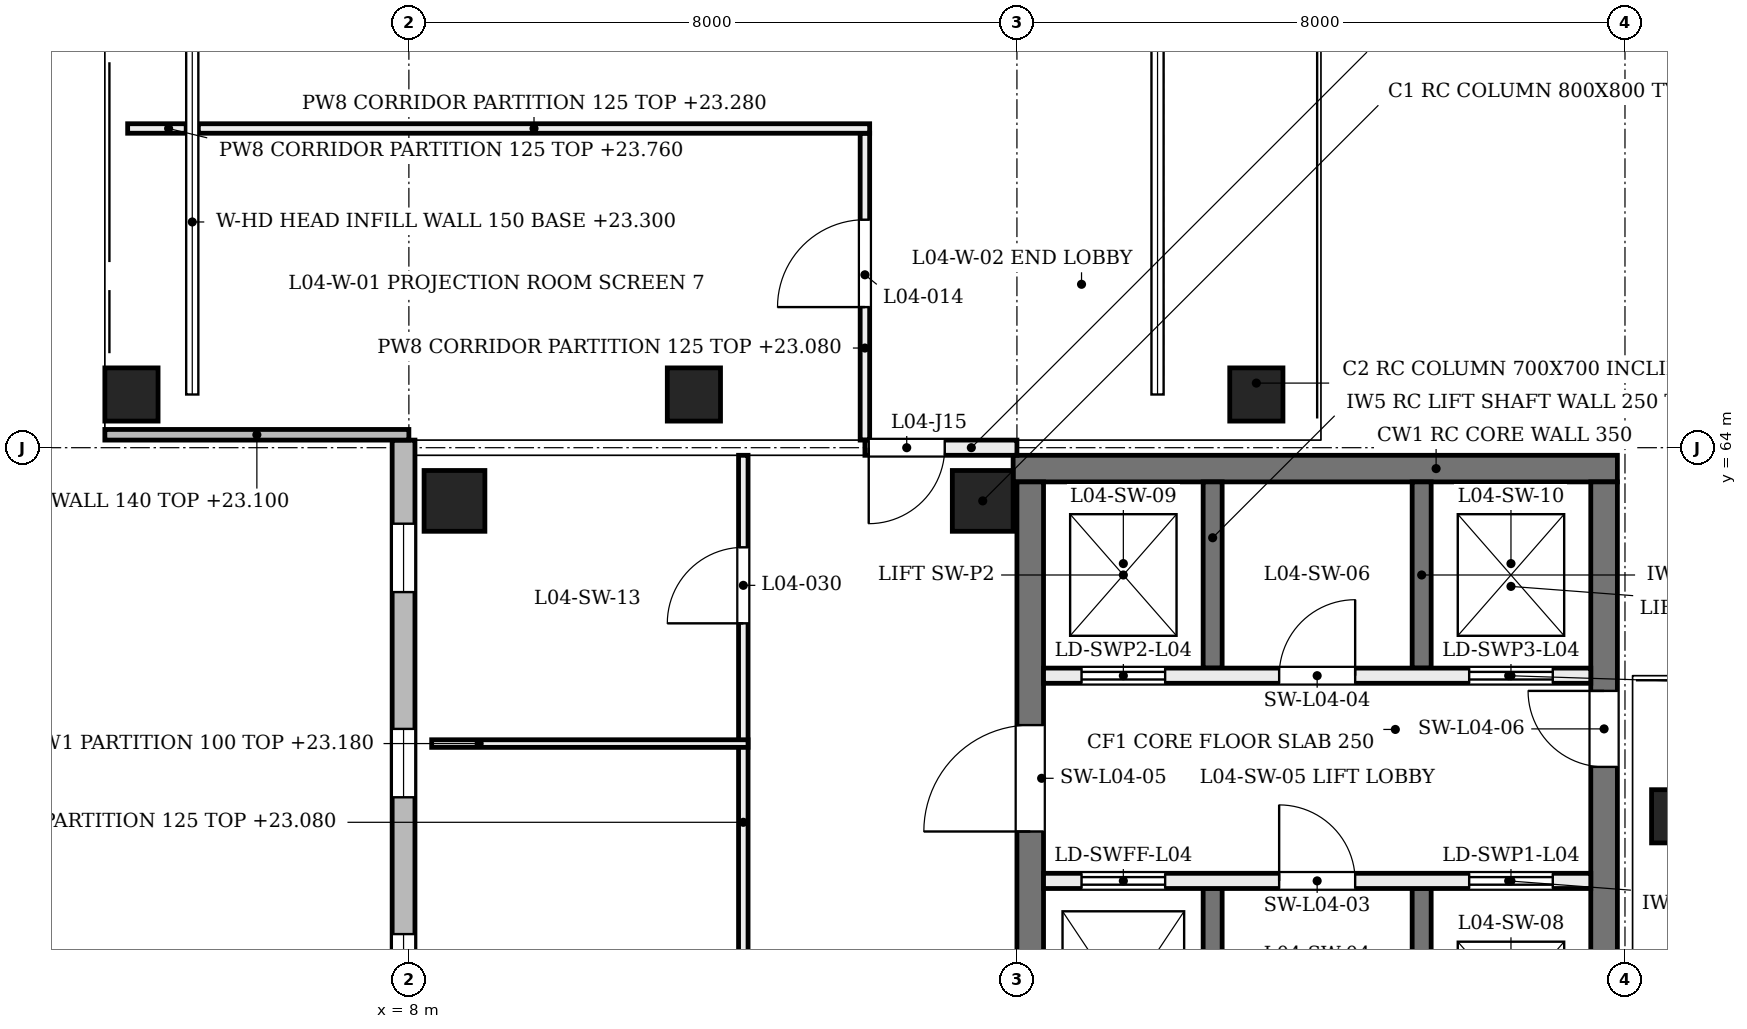
"""IFC4 building model, lengths in metres.
Left out: names, types, materials, properties, quantities, classifications, styles, units other than length and angle.
Written with IfcOpenShell. Run it as: python <this file> out.ifc"""

import sys

from ifc_helpers import new_model, si_unit, direction, frame, frame_2d, origin, origin_2d, place, context, subcontext, project, spatial, rectangle, extrude, element, fill, save


model = new_model("IFC4")
c1 = context("Model", 3, precision=1e-05, world=origin(), true_north=direction((0.0, 1.0)))
c2 = subcontext(c1, "Body", "Model", "MODEL_VIEW")
j1 = project(units=[si_unit("LENGTHUNIT", "METRE"), si_unit("PLANEANGLEUNIT", "RADIAN")], contexts=[c1])
p1 = place(None, origin())
s1 = spatial("IfcSite", under=j1, at=p1, CompositionType="ELEMENT")
p2 = place(p1, origin())
s2 = spatial("IfcBuilding", under=s1, at=p2, CompositionType="ELEMENT")
p3 = place(p2, frame((0.0, 0.0, 19.2)))
s3 = spatial("IfcBuildingStorey", under=s2, at=p3, CompositionType="ELEMENT", Elevation=19.2)
p4 = place(p3, frame((15.95, 63.725, 0.0), z_axis=(0.0, 0.0, 1.0), x_axis=(1.0, 0.0, 0.0)))
e1 = element("IfcWall", 1, at=p4, inside=s3, PredefinedType="SHEAR", context=c2, shape_type="SweptSolid", body=[
    extrude(rectangle(XDim=7.95, YDim=0.35, at=frame_2d((3.975, 0.0))), origin(), (0.0, 0.0, 1.0), 4.58),
])
p5 = place(p3, frame((16.175, 48.35, 0.0), z_axis=(0.0, 0.0, 1.0), x_axis=(0.0, 1.0, 0.0)))
e2 = element("IfcWall", 2, at=p5, inside=s3, PredefinedType="SHEAR", context=c2, shape_type="SweptSolid", body=[
    extrude(rectangle(XDim=15.2, YDim=0.35, at=frame_2d((7.6, 0.0))), origin(), (0.0, 0.0, 1.0), 4.58),
])
p6 = place(p5, frame((0.95, 0.0, 0.0)))
e3 = element("IfcOpeningElement", 3, at=p6, cuts=e2, PredefinedType="OPENING", context=c2, shape_type="SweptSolid", body=[
    extrude(rectangle(XDim=1.0, YDim=2.1, at=frame_2d((0.5, 1.05))), frame((0.0, 0.185, 0.0), z_axis=(0.0, -1.0, 0.0), x_axis=(1.0, 0.0, 0.0)), (0.0, 0.0, 1.0), 0.37),
])
p7 = place(p5, frame((10.6, 0.0, 0.0)))
e4 = element("IfcOpeningElement", 4, at=p7, cuts=e2, PredefinedType="OPENING", context=c2, shape_type="SweptSolid", body=[
    extrude(rectangle(XDim=1.4, YDim=2.1, at=frame_2d((0.7, 1.05))), frame((0.0, 0.185, 0.0), z_axis=(0.0, -1.0, 0.0), x_axis=(1.0, 0.0, 0.0)), (0.0, 0.0, 1.0), 0.37),
])
p8 = place(p3, frame((23.725, 48.35, 0.0), z_axis=(0.0, 0.0, 1.0), x_axis=(0.0, 1.0, 0.0)))
e5 = element("IfcWall", 5, at=p8, inside=s3, PredefinedType="SHEAR", context=c2, shape_type="SweptSolid", body=[
    extrude(rectangle(XDim=15.2, YDim=0.35, at=frame_2d((7.6, 0.0))), origin(), (0.0, 0.0, 1.0), 4.58),
])
p9 = place(p8, frame((0.95, 0.0, 0.0)))
e6 = element("IfcOpeningElement", 6, at=p9, cuts=e5, PredefinedType="OPENING", context=c2, shape_type="SweptSolid", body=[
    extrude(rectangle(XDim=1.0, YDim=2.1, at=frame_2d((0.5, 1.05))), frame((0.0, 0.185, 0.0), z_axis=(0.0, -1.0, 0.0), x_axis=(1.0, 0.0, 0.0)), (0.0, 0.0, 1.0), 0.37),
])
p10 = place(p8, frame((11.45, 0.0, 0.0)))
e7 = element("IfcOpeningElement", 7, at=p10, cuts=e5, PredefinedType="OPENING", context=c2, shape_type="SweptSolid", body=[
    extrude(rectangle(XDim=1.0, YDim=2.1, at=frame_2d((0.5, 1.05))), frame((0.0, 0.185, 0.0), z_axis=(0.0, -1.0, 0.0), x_axis=(1.0, 0.0, 0.0)), (0.0, 0.0, 1.0), 0.37),
])
for number, where, z_axis, x_axis in (
    (8, (8.6, 63.3, 0.0), (0.0, 0.0, 1.0), (1.0, 0.0, 0.0)),
    (9, (15.55, 63.3, 0.0), (0.0, 0.0, 1.0), (1.0, 0.0, 0.0)),
):
    element("IfcColumn", number, at=place(p3, frame(where, z_axis=z_axis, x_axis=x_axis)), inside=s3, PredefinedType="COLUMN", context=c2, shape_type="SweptSolid", body=[
        extrude(rectangle(XDim=0.8, YDim=0.8, at=origin_2d()), origin(), (0.0, 0.0, 1.0), 4.8),
    ])
for number, where, z_axis, x_axis in (
    (10, (24.7, 59.4, 0.0), (0.0, -0.204, 0.979), (1.0, 0.0, 0.0)),
    (11, (4.6, 64.7, 0.0), (-0.204, 0.0, 0.979), (0.0, -1.0, 0.0)),
    (12, (12.0, 64.7, 0.0), (-0.204, 0.0, 0.979), (0.0, -1.0, 0.0)),
    (13, (19.4, 64.7, 0.0), (-0.204, 0.0, 0.979), (0.0, -1.0, 0.0)),
):
    element("IfcColumn", number, at=place(p3, frame(where, z_axis=z_axis, x_axis=x_axis)), inside=s3, PredefinedType="COLUMN", context=c2, shape_type="SweptSolid", body=[
        extrude(rectangle(XDim=0.7, YDim=0.7, at=origin_2d()), origin(), (0.0, 0.0, 1.0), 4.903),
    ])
for number, where, z_axis, x_axis in (
    (14, (5.15, 64.9, 4.1), (0.0, 0.0, 1.0), (0.0, 1.0, 0.0)),
    (15, (17.85, 64.9, 4.1), (0.0, 0.0, 1.0), (0.0, 1.0, 0.0)),
):
    element("IfcWall", number, at=place(p3, frame(where, z_axis=z_axis, x_axis=x_axis)), inside=s3, PredefinedType="SOLIDWALL", context=c2, shape_type="SweptSolid", body=[
        extrude(rectangle(XDim=6.9, YDim=0.15, at=frame_2d((3.45, 0.0))), origin(), (0.0, 0.0, 1.0), 0.48),
    ])
p11 = place(p3, frame((7.93, 47.7, 0.0), z_axis=(0.0, 0.0, 1.0), x_axis=(0.0, 1.0, 0.0)))
e16 = element("IfcWall", 16, at=p11, inside=s3, PredefinedType="SOLIDWALL", context=c2, shape_type="SweptSolid", body=[
    extrude(rectangle(XDim=16.4, YDim=0.3, at=frame_2d((8.2, 0.0))), origin(), (0.0, 0.0, 1.0), 3.9),
])
p12 = place(p11, frame((0.9, 0.0, 0.75)))
e17 = element("IfcOpeningElement", 17, at=p12, cuts=e16, PredefinedType="OPENING", context=c2, shape_type="SweptSolid", body=[
    extrude(rectangle(XDim=0.9, YDim=3.1, at=frame_2d((0.45, 1.55))), frame((0.0, 0.16, 0.0), z_axis=(0.0, -1.0, 0.0), x_axis=(1.0, 0.0, 0.0)), (0.0, 0.0, 1.0), 0.32),
])
p13 = place(p11, frame((3.6, 0.0, 0.75)))
e18 = element("IfcOpeningElement", 18, at=p13, cuts=e16, PredefinedType="OPENING", context=c2, shape_type="SweptSolid", body=[
    extrude(rectangle(XDim=0.9, YDim=3.1, at=frame_2d((0.45, 1.55))), frame((0.0, 0.16, 0.0), z_axis=(0.0, -1.0, 0.0), x_axis=(1.0, 0.0, 0.0)), (0.0, 0.0, 1.0), 0.32),
])
p14 = place(p11, frame((6.3, 0.0, 0.75)))
e19 = element("IfcOpeningElement", 19, at=p14, cuts=e16, PredefinedType="OPENING", context=c2, shape_type="SweptSolid", body=[
    extrude(rectangle(XDim=0.9, YDim=3.1, at=frame_2d((0.45, 1.55))), frame((0.0, 0.16, 0.0), z_axis=(0.0, -1.0, 0.0), x_axis=(1.0, 0.0, 0.0)), (0.0, 0.0, 1.0), 0.32),
])
p15 = place(p11, frame((9.0, 0.0, 0.75)))
e20 = element("IfcOpeningElement", 20, at=p15, cuts=e16, PredefinedType="OPENING", context=c2, shape_type="SweptSolid", body=[
    extrude(rectangle(XDim=0.9, YDim=3.1, at=frame_2d((0.45, 1.55))), frame((0.0, 0.16, 0.0), z_axis=(0.0, -1.0, 0.0), x_axis=(1.0, 0.0, 0.0)), (0.0, 0.0, 1.0), 0.32),
])
p16 = place(p11, frame((11.7, 0.0, 0.75)))
e21 = element("IfcOpeningElement", 21, at=p16, cuts=e16, PredefinedType="OPENING", context=c2, shape_type="SweptSolid", body=[
    extrude(rectangle(XDim=0.9, YDim=3.1, at=frame_2d((0.45, 1.55))), frame((0.0, 0.16, 0.0), z_axis=(0.0, -1.0, 0.0), x_axis=(1.0, 0.0, 0.0)), (0.0, 0.0, 1.0), 0.32),
])
p17 = place(p11, frame((14.4, 0.0, 0.75)))
e22 = element("IfcOpeningElement", 22, at=p17, cuts=e16, PredefinedType="OPENING", context=c2, shape_type="SweptSolid", body=[
    extrude(rectangle(XDim=0.9, YDim=3.1, at=frame_2d((0.45, 1.55))), frame((0.0, 0.16, 0.0), z_axis=(0.0, -1.0, 0.0), x_axis=(1.0, 0.0, 0.0)), (0.0, 0.0, 1.0), 0.32),
])
p18 = place(p3, frame((4.0, 64.17, 0.0), z_axis=(0.0, 0.0, 1.0), x_axis=(1.0, 0.0, 0.0)))
e23 = element("IfcWall", 23, at=p18, inside=s3, PredefinedType="SOLIDWALL", context=c2, shape_type="SweptSolid", body=[
    extrude(rectangle(XDim=4.0, YDim=0.14, at=frame_2d((2.0, 0.0))), origin(), (0.0, 0.0, 1.0), 3.9),
])
p19 = place(p3, frame((18.575, 55.2, 0.0), z_axis=(0.0, 0.0, 1.0), x_axis=(0.0, 1.0, 0.0)))
e24 = element("IfcWall", 24, at=p19, inside=s3, PredefinedType="SOLIDWALL", context=c2, shape_type="SweptSolid", body=[
    extrude(rectangle(XDim=3.0, YDim=0.25, at=frame_2d((1.5, 0.0))), origin(), (0.0, 0.0, 1.0), 4.55),
])
p20 = place(p3, frame((18.575, 61.1, 0.0), z_axis=(0.0, 0.0, 1.0), x_axis=(0.0, 1.0, 0.0)))
e25 = element("IfcWall", 25, at=p20, inside=s3, PredefinedType="SOLIDWALL", context=c2, shape_type="SweptSolid", body=[
    extrude(rectangle(XDim=2.45, YDim=0.25, at=frame_2d((1.225, 0.0))), origin(), (0.0, 0.0, 1.0), 4.55),
])
p21 = place(p3, frame((21.325, 55.2, 0.0), z_axis=(0.0, 0.0, 1.0), x_axis=(0.0, 1.0, 0.0)))
e26 = element("IfcWall", 26, at=p21, inside=s3, PredefinedType="SOLIDWALL", context=c2, shape_type="SweptSolid", body=[
    extrude(rectangle(XDim=3.0, YDim=0.25, at=frame_2d((1.5, 0.0))), origin(), (0.0, 0.0, 1.0), 4.55),
])
p22 = place(p3, frame((21.325, 61.1, 0.0), z_axis=(0.0, 0.0, 1.0), x_axis=(0.0, 1.0, 0.0)))
e27 = element("IfcWall", 27, at=p22, inside=s3, PredefinedType="SOLIDWALL", context=c2, shape_type="SweptSolid", body=[
    extrude(rectangle(XDim=2.45, YDim=0.25, at=frame_2d((1.225, 0.0))), origin(), (0.0, 0.0, 1.0), 4.55),
])
p23 = place(p3, frame((16.35, 58.3, 0.0), z_axis=(0.0, 0.0, 1.0), x_axis=(1.0, 0.0, 0.0)))
e28 = element("IfcWall", 28, at=p23, inside=s3, PredefinedType="SOLIDWALL", context=c2, shape_type="SweptSolid", body=[
    extrude(rectangle(XDim=7.2, YDim=0.2, at=frame_2d((3.6, 0.0))), origin(), (0.0, 0.0, 1.0), 4.55),
])
p24 = place(p23, frame((0.5, 0.0, 0.0)))
e29 = element("IfcOpeningElement", 29, at=p24, cuts=e28, PredefinedType="OPENING", context=c2, shape_type="SweptSolid", body=[
    extrude(rectangle(XDim=1.1, YDim=2.1, at=frame_2d((0.55, 1.05))), frame((0.0, 0.11, 0.0), z_axis=(0.0, -1.0, 0.0), x_axis=(1.0, 0.0, 0.0)), (0.0, 0.0, 1.0), 0.22),
])
p25 = place(p23, frame((5.6, 0.0, 0.0)))
e30 = element("IfcOpeningElement", 30, at=p25, cuts=e28, PredefinedType="OPENING", context=c2, shape_type="SweptSolid", body=[
    extrude(rectangle(XDim=1.1, YDim=2.1, at=frame_2d((0.55, 1.05))), frame((0.0, 0.11, 0.0), z_axis=(0.0, -1.0, 0.0), x_axis=(1.0, 0.0, 0.0)), (0.0, 0.0, 1.0), 0.22),
])
p26 = place(p23, frame((3.1, 0.0, 0.0)))
e31 = element("IfcOpeningElement", 31, at=p26, cuts=e28, PredefinedType="OPENING", context=c2, shape_type="SweptSolid", body=[
    extrude(rectangle(XDim=1.0, YDim=2.1, at=frame_2d((0.5, 1.05))), frame((0.0, 0.11, 0.0), z_axis=(0.0, -1.0, 0.0), x_axis=(1.0, 0.0, 0.0)), (0.0, 0.0, 1.0), 0.22),
])
p27 = place(p3, frame((16.35, 61.0, 0.0), z_axis=(0.0, 0.0, 1.0), x_axis=(1.0, 0.0, 0.0)))
e32 = element("IfcWall", 32, at=p27, inside=s3, PredefinedType="SOLIDWALL", context=c2, shape_type="SweptSolid", body=[
    extrude(rectangle(XDim=7.2, YDim=0.2, at=frame_2d((3.6, 0.0))), origin(), (0.0, 0.0, 1.0), 4.55),
])
p28 = place(p27, frame((0.5, 0.0, 0.0)))
e33 = element("IfcOpeningElement", 33, at=p28, cuts=e32, PredefinedType="OPENING", context=c2, shape_type="SweptSolid", body=[
    extrude(rectangle(XDim=1.1, YDim=2.1, at=frame_2d((0.55, 1.05))), frame((0.0, 0.11, 0.0), z_axis=(0.0, -1.0, 0.0), x_axis=(1.0, 0.0, 0.0)), (0.0, 0.0, 1.0), 0.22),
])
p29 = place(p27, frame((5.6, 0.0, 0.0)))
e34 = element("IfcOpeningElement", 34, at=p29, cuts=e32, PredefinedType="OPENING", context=c2, shape_type="SweptSolid", body=[
    extrude(rectangle(XDim=1.1, YDim=2.1, at=frame_2d((0.55, 1.05))), frame((0.0, 0.11, 0.0), z_axis=(0.0, -1.0, 0.0), x_axis=(1.0, 0.0, 0.0)), (0.0, 0.0, 1.0), 0.22),
])
p30 = place(p27, frame((3.1, 0.0, 0.0)))
e35 = element("IfcOpeningElement", 35, at=p30, cuts=e32, PredefinedType="OPENING", context=c2, shape_type="SweptSolid", body=[
    extrude(rectangle(XDim=1.0, YDim=2.1, at=frame_2d((0.5, 1.05))), frame((0.0, 0.11, 0.0), z_axis=(0.0, -1.0, 0.0), x_axis=(1.0, 0.0, 0.0)), (0.0, 0.0, 1.0), 0.22),
])
p31 = place(p3, frame((14.0, 64.1, 0.0), z_axis=(0.0, 0.0, 1.0), x_axis=(0.0, 1.0, 0.0)))
e36 = element("IfcWall", 36, at=p31, inside=s3, PredefinedType="PARTITIONING", context=c2, shape_type="SweptSolid", body=[
    extrude(rectangle(XDim=4.037, YDim=0.125, at=frame_2d((2.019, 0.0))), origin(), (0.0, 0.0, 1.0), 3.88),
])
p32 = place(p31, frame((1.75, 0.0, 0.0)))
e37 = element("IfcOpeningElement", 37, at=p32, cuts=e36, PredefinedType="OPENING", context=c2, shape_type="SweptSolid", body=[
    extrude(rectangle(XDim=1.15, YDim=2.1, at=frame_2d((0.575, 1.05))), frame((0.0, 0.073, 0.0), z_axis=(0.0, -1.0, 0.0), x_axis=(1.0, 0.0, 0.0)), (0.0, 0.0, 1.0), 0.145),
])
p33 = place(p3, frame((4.3, 68.2, 0.0), z_axis=(0.0, 0.0, 1.0), x_axis=(1.0, 0.0, 0.0)))
e38 = element("IfcWall", 38, at=p33, inside=s3, PredefinedType="PARTITIONING", context=c2, shape_type="SweptSolid", body=[
    extrude(rectangle(XDim=0.77, YDim=0.125, at=frame_2d((0.385, 0.0))), origin(), (0.0, 0.0, 1.0), 4.56),
])
p34 = place(p3, frame((5.23, 68.2, 0.0), z_axis=(0.0, 0.0, 1.0), x_axis=(1.0, 0.0, 0.0)))
e39 = element("IfcWall", 39, at=p34, inside=s3, PredefinedType="PARTITIONING", context=c2, shape_type="SweptSolid", body=[
    extrude(rectangle(XDim=8.833, YDim=0.125, at=frame_2d((4.416, 0.0))), origin(), (0.0, 0.0, 1.0), 4.08),
])
p35 = place(p3, frame((12.4, 54.242, 0.0), z_axis=(0.0, 0.0, 1.0), x_axis=(0.0, 1.0, 0.0)))
e40 = element("IfcWall", 40, at=p35, inside=s3, PredefinedType="PARTITIONING", context=c2, shape_type="SweptSolid", body=[
    extrude(rectangle(XDim=9.658, YDim=0.125, at=frame_2d((4.829, 0.0))), origin(), (0.0, 0.0, 1.0), 3.88),
])
p36 = place(p35, frame((7.447, 0.0, 0.0)))
e41 = element("IfcOpeningElement", 41, at=p36, cuts=e40, PredefinedType="OPENING", context=c2, shape_type="SweptSolid", body=[
    extrude(rectangle(XDim=1.0, YDim=2.1, at=frame_2d((0.5, 1.05))), frame((0.0, 0.073, 0.0), z_axis=(0.0, -1.0, 0.0), x_axis=(1.0, 0.0, 0.0)), (0.0, 0.0, 1.0), 0.145),
])
p37 = place(p3, frame((8.3, 60.107, 0.0), z_axis=(0.0, 0.0, 1.0), x_axis=(1.0, 0.0, 0.0)))
e42 = element("IfcWall", 42, at=p37, inside=s3, PredefinedType="PARTITIONING", context=c2, shape_type="SweptSolid", body=[
    extrude(rectangle(XDim=4.162, YDim=0.1, at=frame_2d((2.081, 0.0))), origin(), (0.0, 0.0, 1.0), 3.98),
])
p38 = place(p3, frame((14.0, 64.0, 0.0), z_axis=(0.0, 0.0, 1.0), x_axis=(1.0, 0.0, 0.0)))
e43 = element("IfcWall", 43, at=p38, inside=s3, PredefinedType="PARTITIONING", context=c2, shape_type="SweptSolid", body=[
    extrude(rectangle(XDim=2.0, YDim=0.2, at=frame_2d((1.0, 0.0))), origin(), (0.0, 0.0, 1.0), 3.88),
])
p39 = place(p38, frame((0.05, 0.0, 0.0)))
e44 = element("IfcOpeningElement", 44, at=p39, cuts=e43, PredefinedType="OPENING", context=c2, shape_type="SweptSolid", body=[
    extrude(rectangle(XDim=1.0, YDim=2.1, at=frame_2d((0.5, 1.05))), frame((0.0, 0.11, 0.0), z_axis=(0.0, -1.0, 0.0), x_axis=(1.0, 0.0, 0.0)), (0.0, 0.0, 1.0), 0.22),
])
p40 = place(p15, origin())
e45 = element("IfcWindow", 45, at=p40, inside=s3, PartitioningType="SINGLE_PANEL", PredefinedType="WINDOW", context=c2, shape_type="SweptSolid", body=[
    extrude(rectangle(XDim=0.9, YDim=3.1, at=frame_2d((0.45, 1.55))), frame((0.0, 0.03, 0.0), z_axis=(0.0, -1.0, 0.0), x_axis=(1.0, 0.0, 0.0)), (0.0, 0.0, 1.0), 0.06),
])
fill(e20, e45)
p41 = place(p16, origin())
e46 = element("IfcWindow", 46, at=p41, inside=s3, PartitioningType="SINGLE_PANEL", PredefinedType="WINDOW", context=c2, shape_type="SweptSolid", body=[
    extrude(rectangle(XDim=0.9, YDim=3.1, at=frame_2d((0.45, 1.55))), frame((0.0, 0.03, 0.0), z_axis=(0.0, -1.0, 0.0), x_axis=(1.0, 0.0, 0.0)), (0.0, 0.0, 1.0), 0.06),
])
fill(e21, e46)
p42 = place(p17, origin())
e47 = element("IfcWindow", 47, at=p42, inside=s3, PartitioningType="SINGLE_PANEL", PredefinedType="WINDOW", context=c2, shape_type="SweptSolid", body=[
    extrude(rectangle(XDim=0.9, YDim=3.1, at=frame_2d((0.45, 1.55))), frame((0.0, 0.03, 0.0), z_axis=(0.0, -1.0, 0.0), x_axis=(1.0, 0.0, 0.0)), (0.0, 0.0, 1.0), 0.06),
])
fill(e22, e47)
p43 = place(p24, origin())
e48 = element("IfcDoor", 48, at=p43, inside=s3, OperationType="DOUBLE_DOOR_SLIDING", PredefinedType="DOOR", context=c2, shape_type="SweptSolid", body=[
    extrude(rectangle(XDim=1.1, YDim=2.1, at=frame_2d((0.55, 1.05))), frame((0.0, 0.025, 0.0), z_axis=(0.0, -1.0, 0.0), x_axis=(1.0, 0.0, 0.0)), (0.0, 0.0, 1.0), 0.05),
])
fill(e29, e48)
p44 = place(p25, origin())
e49 = element("IfcDoor", 49, at=p44, inside=s3, OperationType="DOUBLE_DOOR_SLIDING", PredefinedType="DOOR", context=c2, shape_type="SweptSolid", body=[
    extrude(rectangle(XDim=1.1, YDim=2.1, at=frame_2d((0.55, 1.05))), frame((0.0, 0.025, 0.0), z_axis=(0.0, -1.0, 0.0), x_axis=(1.0, 0.0, 0.0)), (0.0, 0.0, 1.0), 0.05),
])
fill(e30, e49)
p45 = place(p28, frame((1.1, 0.0, 0.0), z_axis=(0.0, 0.0, 1.0), x_axis=(-1.0, 0.0, 0.0)))
e50 = element("IfcDoor", 50, at=p45, inside=s3, OperationType="DOUBLE_DOOR_SLIDING", PredefinedType="DOOR", context=c2, shape_type="SweptSolid", body=[
    extrude(rectangle(XDim=1.1, YDim=2.1, at=frame_2d((0.55, 1.05))), frame((0.0, 0.025, 0.0), z_axis=(0.0, -1.0, 0.0), x_axis=(1.0, 0.0, 0.0)), (0.0, 0.0, 1.0), 0.05),
])
fill(e33, e50)
p46 = place(p29, frame((1.1, 0.0, 0.0), z_axis=(0.0, 0.0, 1.0), x_axis=(-1.0, 0.0, 0.0)))
e51 = element("IfcDoor", 51, at=p46, inside=s3, OperationType="DOUBLE_DOOR_SLIDING", PredefinedType="DOOR", context=c2, shape_type="SweptSolid", body=[
    extrude(rectangle(XDim=1.1, YDim=2.1, at=frame_2d((0.55, 1.05))), frame((0.0, 0.025, 0.0), z_axis=(0.0, -1.0, 0.0), x_axis=(1.0, 0.0, 0.0)), (0.0, 0.0, 1.0), 0.05),
])
fill(e34, e51)
p47 = place(p26, origin())
e52 = element("IfcDoor", 52, at=p47, inside=s3, OperationType="SINGLE_SWING_LEFT", PredefinedType="DOOR", context=c2, shape_type="SweptSolid", body=[
    extrude(rectangle(XDim=1.0, YDim=2.1, at=frame_2d((0.5, 1.05))), frame((0.0, 0.025, 0.0), z_axis=(0.0, -1.0, 0.0), x_axis=(1.0, 0.0, 0.0)), (0.0, 0.0, 1.0), 0.05),
])
fill(e31, e52)
p48 = place(p30, frame((1.0, 0.0, 0.0), z_axis=(0.0, 0.0, 1.0), x_axis=(-1.0, 0.0, 0.0)))
e53 = element("IfcDoor", 53, at=p48, inside=s3, OperationType="SINGLE_SWING_RIGHT", PredefinedType="DOOR", context=c2, shape_type="SweptSolid", body=[
    extrude(rectangle(XDim=1.0, YDim=2.1, at=frame_2d((0.5, 1.05))), frame((0.0, 0.025, 0.0), z_axis=(0.0, -1.0, 0.0), x_axis=(1.0, 0.0, 0.0)), (0.0, 0.0, 1.0), 0.05),
])
fill(e35, e53)
p49 = place(p7, origin())
e54 = element("IfcDoor", 54, at=p49, inside=s3, OperationType="SINGLE_SWING_LEFT", PredefinedType="DOOR", context=c2, shape_type="SweptSolid", body=[
    extrude(rectangle(XDim=1.4, YDim=2.1, at=frame_2d((0.7, 1.05))), frame((0.0, 0.025, 0.0), z_axis=(0.0, -1.0, 0.0), x_axis=(1.0, 0.0, 0.0)), (0.0, 0.0, 1.0), 0.05),
])
fill(e4, e54)
p50 = place(p10, frame((1.0, 0.0, 0.0), z_axis=(0.0, 0.0, 1.0), x_axis=(-1.0, 0.0, 0.0)))
e55 = element("IfcDoor", 55, at=p50, inside=s3, OperationType="SINGLE_SWING_RIGHT", PredefinedType="DOOR", context=c2, shape_type="SweptSolid", body=[
    extrude(rectangle(XDim=1.0, YDim=2.1, at=frame_2d((0.5, 1.05))), frame((0.0, 0.025, 0.0), z_axis=(0.0, -1.0, 0.0), x_axis=(1.0, 0.0, 0.0)), (0.0, 0.0, 1.0), 0.05),
])
fill(e7, e55)
p51 = place(p32, origin())
e56 = element("IfcDoor", 56, at=p51, inside=s3, OperationType="SINGLE_SWING_LEFT", PredefinedType="DOOR", context=c2, shape_type="SweptSolid", body=[
    extrude(rectangle(XDim=1.15, YDim=2.1, at=frame_2d((0.575, 1.05))), frame((0.0, 0.025, 0.0), z_axis=(0.0, -1.0, 0.0), x_axis=(1.0, 0.0, 0.0)), (0.0, 0.0, 1.0), 0.05),
])
fill(e37, e56)
p52 = place(p36, origin())
e57 = element("IfcDoor", 57, at=p52, inside=s3, OperationType="SINGLE_SWING_LEFT", PredefinedType="DOOR", context=c2, shape_type="SweptSolid", body=[
    extrude(rectangle(XDim=1.0, YDim=2.1, at=frame_2d((0.5, 1.05))), frame((0.0, 0.025, 0.0), z_axis=(0.0, -1.0, 0.0), x_axis=(1.0, 0.0, 0.0)), (0.0, 0.0, 1.0), 0.05),
])
fill(e41, e57)
p53 = place(p39, frame((1.0, 0.0, 0.0), z_axis=(0.0, 0.0, 1.0), x_axis=(-1.0, 0.0, 0.0)))
e58 = element("IfcDoor", 58, at=p53, inside=s3, OperationType="SINGLE_SWING_LEFT", PredefinedType="DOOR", context=c2, shape_type="SweptSolid", body=[
    extrude(rectangle(XDim=1.0, YDim=2.1, at=frame_2d((0.5, 1.05))), frame((0.0, 0.025, 0.0), z_axis=(0.0, -1.0, 0.0), x_axis=(1.0, 0.0, 0.0)), (0.0, 0.0, 1.0), 0.05),
])
fill(e44, e58)
save(model, sys.argv[1])
